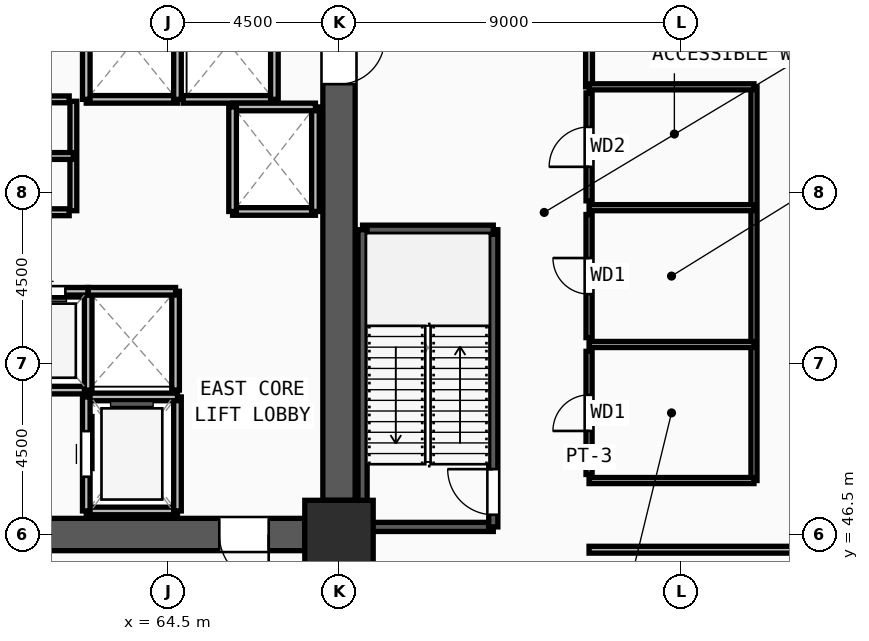
"""IFC4 building model, lengths in metres.
Left out: names, types, materials, properties, quantities, classifications, styles, units other than length and angle.
Written with IfcOpenShell. Run it as: python <this file> out.ifc"""

import sys

from ifc_helpers import new_model, si_unit, direction, frame, frame_2d, origin, origin_2d, place, context, subcontext, project, spatial, rectangle, extrude, source, transform, mapped, element, fill, save


model = new_model("IFC4")
c1 = context("Model", 3, precision=1e-05, world=origin(), true_north=direction((0.0, 1.0)))
c2 = subcontext(c1, "Body", "Model", "MODEL_VIEW")
j1 = project(units=[si_unit("LENGTHUNIT", "METRE"), si_unit("PLANEANGLEUNIT", "RADIAN")], contexts=[c1])
p1 = place(None, origin())
s1 = spatial("IfcSite", under=j1, at=p1, CompositionType="ELEMENT")
p2 = place(p1, origin())
s2 = spatial("IfcBuilding", under=s1, at=p2, CompositionType="ELEMENT")
p3 = place(p2, frame((0.0, 0.0, 14.4)))
s3 = spatial("IfcBuildingStorey", under=s2, at=p3, CompositionType="ELEMENT", Elevation=14.4)
m1 = source(origin(), c2, "Body", "SweptSolid", [
    extrude(rectangle(XDim=1.8, YDim=1.8, at=origin_2d()), origin(), (0.0, 0.0, 1.0), 4.5),
])
p4 = place(p3, frame((69.0, 46.5, 0.0), z_axis=(0.0, 0.0, 1.0), x_axis=(1.0, 0.0, 0.0)))
e1 = element("IfcColumn", 1, at=p4, inside=s3, PredefinedType="COLUMN", context=c2, shape_type="MappedRepresentation", body=[
    mapped(m1, transform((0.0, 0.0, 0.0), x_axis=(1.0, 0.0, 0.0), y_axis=(0.0, 1.0, 0.0), z_axis=(0.0, 0.0, 1.0), scale=1.0)),
])
p5 = place(p3, frame((69.0, 60.6, 0.0), z_axis=(0.0, 0.0, 1.0), x_axis=(0.0, -1.0, 0.0)))
e2 = element("IfcWall", 2, at=p5, inside=s3, PredefinedType="SHEAR", context=c2, shape_type="SweptSolid", body=[
    extrude(rectangle(XDim=13.2, YDim=0.85, at=frame_2d((6.6, 0.0))), origin(), (0.0, 0.0, 1.0), 4.25),
])
m2 = source(origin(), c2, "Body", "SweptSolid", [
    extrude(rectangle(XDim=1.2, YDim=2.2, at=frame_2d((0.6, 1.1))), frame((0.0, 0.435, 0.0), z_axis=(0.0, -1.0, 0.0), x_axis=(1.0, 0.0, 0.0)), (0.0, 0.0, 1.0), 0.87),
])
p6 = place(p5, frame((1.05, 0.0, 0.0)))
e3 = element("IfcOpeningElement", 3, at=p6, cuts=e2, PredefinedType="OPENING", context=c2, shape_type="MappedRepresentation", body=[
    mapped(m2, transform((0.0, 0.0, 0.0), x_axis=(1.0, 0.0, 0.0), y_axis=(0.0, 1.0, 0.0), z_axis=(0.0, 0.0, 1.0), scale=1.0)),
])
p7 = place(p3, frame((68.1, 46.5, 0.0), z_axis=(0.0, 0.0, 1.0), x_axis=(-1.0, 0.0, 0.0)))
e4 = element("IfcWall", 4, at=p7, inside=s3, PredefinedType="SHEAR", context=c2, shape_type="SweptSolid", body=[
    extrude(rectangle(XDim=7.2, YDim=0.85, at=frame_2d((3.6, 0.0))), origin(), (0.0, 0.0, 1.0), 4.25),
])
m3 = source(origin(), c2, "Body", "SweptSolid", [
    extrude(rectangle(XDim=1.3, YDim=2.2, at=frame_2d((0.65, 1.1))), frame((0.0, 0.435, 0.0), z_axis=(0.0, -1.0, 0.0), x_axis=(1.0, 0.0, 0.0)), (0.0, 0.0, 1.0), 0.87),
])
p8 = place(p7, frame((0.95, 0.0, 0.0)))
e5 = element("IfcOpeningElement", 5, at=p8, cuts=e4, PredefinedType="OPENING", context=c2, shape_type="MappedRepresentation", body=[
    mapped(m3, transform((0.0, 0.0, 0.0), x_axis=(1.0, 0.0, 0.0), y_axis=(0.0, 1.0, 0.0), z_axis=(0.0, 0.0, 1.0), scale=1.0)),
])
p9 = place(p3, frame((69.62, 46.7, 0.0), z_axis=(0.0, 0.0, 1.0), x_axis=(1.0, 0.0, 0.0)))
e6 = element("IfcWall", 6, at=p9, inside=s3, PredefinedType="SOLIDWALL", context=c2, shape_type="SweptSolid", body=[
    extrude(rectangle(XDim=3.44, YDim=0.24, at=frame_2d((1.72, 0.0))), origin(), (0.0, 0.0, 1.0), 4.25),
])
p10 = place(p3, frame((73.06, 46.7, 0.0), z_axis=(0.0, 0.0, 1.0), x_axis=(0.0, 1.0, 0.0)))
e7 = element("IfcWall", 7, at=p10, inside=s3, PredefinedType="SOLIDWALL", context=c2, shape_type="SweptSolid", body=[
    extrude(rectangle(XDim=7.82, YDim=0.24, at=frame_2d((3.91, 0.0))), origin(), (0.0, 0.0, 1.0), 4.25),
])
m4 = source(origin(), c2, "Body", "SweptSolid", [
    extrude(rectangle(XDim=1.2, YDim=2.2, at=frame_2d((0.6, 1.1))), frame((0.0, 0.13, 0.0), z_axis=(0.0, -1.0, 0.0), x_axis=(1.0, 0.0, 0.0)), (0.0, 0.0, 1.0), 0.26),
])
p11 = place(p10, frame((0.32, 0.0, 0.0)))
e8 = element("IfcOpeningElement", 8, at=p11, cuts=e7, PredefinedType="OPENING", context=c2, shape_type="MappedRepresentation", body=[
    mapped(m4, transform((0.0, 0.0, 0.0), x_axis=(1.0, 0.0, 0.0), y_axis=(0.0, 1.0, 0.0), z_axis=(0.0, 0.0, 1.0), scale=1.0)),
])
p12 = place(p3, frame((73.06, 54.52, 0.0), z_axis=(0.0, 0.0, 1.0), x_axis=(-1.0, 0.0, 0.0)))
e9 = element("IfcWall", 9, at=p12, inside=s3, PredefinedType="SOLIDWALL", context=c2, shape_type="SweptSolid", body=[
    extrude(rectangle(XDim=3.44, YDim=0.24, at=frame_2d((1.72, 0.0))), origin(), (0.0, 0.0, 1.0), 4.25),
])
p13 = place(p3, frame((69.62, 54.52, 0.0), z_axis=(0.0, 0.0, 1.0), x_axis=(0.0, -1.0, 0.0)))
e10 = element("IfcWall", 10, at=p13, inside=s3, PredefinedType="SOLIDWALL", context=c2, shape_type="SweptSolid", body=[
    extrude(rectangle(XDim=7.82, YDim=0.24, at=frame_2d((3.91, 0.0))), origin(), (0.0, 0.0, 1.0), 4.25),
])
p14 = place(p3, frame((62.35, 47.12, 0.0), z_axis=(0.0, 0.0, 1.0), x_axis=(1.0, 0.0, 0.0)))
e11 = element("IfcWall", 11, at=p14, inside=s3, PredefinedType="SOLIDWALL", context=c2, shape_type="SweptSolid", body=[
    extrude(rectangle(XDim=2.4, YDim=0.2, at=frame_2d((1.2, 0.0))), origin(), (0.0, 0.0, 1.0), 4.25),
])
p15 = place(p3, frame((64.75, 47.12, 0.0), z_axis=(0.0, 0.0, 1.0), x_axis=(0.0, 1.0, 0.0)))
e12 = element("IfcWall", 12, at=p15, inside=s3, PredefinedType="SOLIDWALL", context=c2, shape_type="SweptSolid", body=[
    extrude(rectangle(XDim=3.0, YDim=0.2, at=frame_2d((1.5, 0.0))), origin(), (0.0, 0.0, 1.0), 4.25),
])
p16 = place(p3, frame((64.75, 50.12, 0.0), z_axis=(0.0, 0.0, 1.0), x_axis=(-1.0, 0.0, 0.0)))
e13 = element("IfcWall", 13, at=p16, inside=s3, PredefinedType="SOLIDWALL", context=c2, shape_type="SweptSolid", body=[
    extrude(rectangle(XDim=2.4, YDim=0.2, at=frame_2d((1.2, 0.0))), origin(), (0.0, 0.0, 1.0), 4.25),
])
p17 = place(p3, frame((62.35, 50.12, 0.0), z_axis=(0.0, 0.0, 1.0), x_axis=(0.0, -1.0, 0.0)))
e14 = element("IfcWall", 14, at=p17, inside=s3, PredefinedType="SOLIDWALL", context=c2, shape_type="SweptSolid", body=[
    extrude(rectangle(XDim=3.0, YDim=0.2, at=frame_2d((1.5, 0.0))), origin(), (0.0, 0.0, 1.0), 4.25),
])
m5 = source(origin(), c2, "Body", "SweptSolid", [
    extrude(rectangle(XDim=1.2, YDim=2.3, at=frame_2d((0.6, 1.15))), frame((0.0, 0.11, 0.0), z_axis=(0.0, -1.0, 0.0), x_axis=(1.0, 0.0, 0.0)), (0.0, 0.0, 1.0), 0.22),
])
p18 = place(p17, frame((0.9, 0.0, 0.0)))
e15 = element("IfcOpeningElement", 15, at=p18, cuts=e14, PredefinedType="OPENING", context=c2, shape_type="MappedRepresentation", body=[
    mapped(m5, transform((0.0, 0.0, 0.0), x_axis=(1.0, 0.0, 0.0), y_axis=(0.0, 1.0, 0.0), z_axis=(0.0, 0.0, 1.0), scale=1.0)),
])
p19 = place(p3, frame((62.35, 57.95, 0.0), z_axis=(0.0, 0.0, 1.0), x_axis=(1.0, 0.0, 0.0)))
e16 = element("IfcWall", 16, at=p19, inside=s3, PredefinedType="SOLIDWALL", context=c2, shape_type="SweptSolid", body=[
    extrude(rectangle(XDim=2.4, YDim=0.2, at=frame_2d((1.2, 0.0))), origin(), (0.0, 0.0, 1.0), 4.25),
])
for number, where, z_axis, x_axis in (
    (17, (64.75, 57.95, 0.0), (0.0, 0.0, 1.0), (0.0, 1.0, 0.0)),
    (18, (62.35, 60.88, 0.0), (0.0, 0.0, 1.0), (0.0, -1.0, 0.0)),
):
    element("IfcWall", number, at=place(p3, frame(where, z_axis=z_axis, x_axis=x_axis)), inside=s3, PredefinedType="SOLIDWALL", context=c2, shape_type="SweptSolid", body=[
        extrude(rectangle(XDim=2.93, YDim=0.2, at=frame_2d((1.465, 0.0))), origin(), (0.0, 0.0, 1.0), 4.25),
    ])
p20 = place(p3, frame((64.9, 57.95, 0.0), z_axis=(0.0, 0.0, 1.0), x_axis=(1.0, 0.0, 0.0)))
e19 = element("IfcWall", 19, at=p20, inside=s3, PredefinedType="SOLIDWALL", context=c2, shape_type="SweptSolid", body=[
    extrude(rectangle(XDim=2.4, YDim=0.2, at=frame_2d((1.2, 0.0))), origin(), (0.0, 0.0, 1.0), 4.25),
])
p21 = place(p3, frame((67.3, 57.95, 0.0), z_axis=(0.0, 0.0, 1.0), x_axis=(0.0, 1.0, 0.0)))
e20 = element("IfcWall", 20, at=p21, inside=s3, PredefinedType="SOLIDWALL", context=c2, shape_type="SweptSolid", body=[
    extrude(rectangle(XDim=2.93, YDim=0.2, at=frame_2d((1.465, 0.0))), origin(), (0.0, 0.0, 1.0), 4.25),
])
p22 = place(p3, frame((66.2, 55.0, 0.0), z_axis=(0.0, 0.0, 1.0), x_axis=(1.0, 0.0, 0.0)))
e21 = element("IfcWall", 21, at=p22, inside=s3, PredefinedType="SOLIDWALL", context=c2, shape_type="SweptSolid", body=[
    extrude(rectangle(XDim=2.18, YDim=0.2, at=frame_2d((1.09, 0.0))), origin(), (0.0, 0.0, 1.0), 4.25),
])
p23 = place(p3, frame((68.38, 55.0, 0.0), z_axis=(0.0, 0.0, 1.0), x_axis=(0.0, 1.0, 0.0)))
e22 = element("IfcWall", 22, at=p23, inside=s3, PredefinedType="SOLIDWALL", context=c2, shape_type="SweptSolid", body=[
    extrude(rectangle(XDim=2.75, YDim=0.2, at=frame_2d((1.375, 0.0))), origin(), (0.0, 0.0, 1.0), 4.25),
])
p24 = place(p3, frame((68.38, 57.75, 0.0), z_axis=(0.0, 0.0, 1.0), x_axis=(-1.0, 0.0, 0.0)))
e23 = element("IfcWall", 23, at=p24, inside=s3, PredefinedType="SOLIDWALL", context=c2, shape_type="SweptSolid", body=[
    extrude(rectangle(XDim=2.18, YDim=0.2, at=frame_2d((1.09, 0.0))), origin(), (0.0, 0.0, 1.0), 4.25),
])
p25 = place(p3, frame((66.2, 57.75, 0.0), z_axis=(0.0, 0.0, 1.0), x_axis=(0.0, -1.0, 0.0)))
e24 = element("IfcWall", 24, at=p25, inside=s3, PredefinedType="SOLIDWALL", context=c2, shape_type="SweptSolid", body=[
    extrude(rectangle(XDim=2.75, YDim=0.2, at=frame_2d((1.375, 0.0))), origin(), (0.0, 0.0, 1.0), 4.25),
])
p26 = place(p3, frame((60.1, 50.3, 0.0), z_axis=(0.0, 0.0, 1.0), x_axis=(1.0, 0.0, 0.0)))
e25 = element("IfcWall", 25, at=p26, inside=s3, PredefinedType="SOLIDWALL", context=c2, shape_type="SweptSolid", body=[
    extrude(rectangle(XDim=2.3, YDim=0.2, at=frame_2d((1.15, 0.0))), origin(), (0.0, 0.0, 1.0), 4.25),
])
p27 = place(p3, frame((62.4, 50.3, 0.0), z_axis=(0.0, 0.0, 1.0), x_axis=(0.0, 1.0, 0.0)))
e26 = element("IfcWall", 26, at=p27, inside=s3, PredefinedType="SOLIDWALL", context=c2, shape_type="SweptSolid", body=[
    extrude(rectangle(XDim=2.6, YDim=0.2, at=frame_2d((1.3, 0.0))), origin(), (0.0, 0.0, 1.0), 4.25),
])
p28 = place(p3, frame((62.4, 52.9, 0.0), z_axis=(0.0, 0.0, 1.0), x_axis=(-1.0, 0.0, 0.0)))
e27 = element("IfcWall", 27, at=p28, inside=s3, PredefinedType="SOLIDWALL", context=c2, shape_type="SweptSolid", body=[
    extrude(rectangle(XDim=2.3, YDim=0.2, at=frame_2d((1.15, 0.0))), origin(), (0.0, 0.0, 1.0), 4.25),
])
m6 = source(origin(), c2, "Body", "SweptSolid", [
    extrude(rectangle(XDim=1.1, YDim=2.2, at=frame_2d((0.55, 1.1))), frame((0.0, 0.11, 0.0), z_axis=(0.0, -1.0, 0.0), x_axis=(1.0, 0.0, 0.0)), (0.0, 0.0, 1.0), 0.22),
])
p29 = place(p28, frame((0.6, 0.0, 0.0)))
e28 = element("IfcOpeningElement", 28, at=p29, cuts=e27, PredefinedType="OPENING", context=c2, shape_type="MappedRepresentation", body=[
    mapped(m6, transform((0.0, 0.0, 0.0), x_axis=(1.0, 0.0, 0.0), y_axis=(0.0, 1.0, 0.0), z_axis=(0.0, 0.0, 1.0), scale=1.0)),
])
p30 = place(p3, frame((64.7, 50.3, 0.0), z_axis=(0.0, 0.0, 1.0), x_axis=(0.0, 1.0, 0.0)))
e29 = element("IfcWall", 29, at=p30, inside=s3, PredefinedType="SOLIDWALL", context=c2, shape_type="SweptSolid", body=[
    extrude(rectangle(XDim=2.6, YDim=0.2, at=frame_2d((1.3, 0.0))), origin(), (0.0, 0.0, 1.0), 4.25),
])
p31 = place(p3, frame((64.7, 52.9, 0.0), z_axis=(0.0, 0.0, 1.0), x_axis=(-1.0, 0.0, 0.0)))
e30 = element("IfcWall", 30, at=p31, inside=s3, PredefinedType="SOLIDWALL", context=c2, shape_type="SweptSolid", body=[
    extrude(rectangle(XDim=2.3, YDim=0.2, at=frame_2d((1.15, 0.0))), origin(), (0.0, 0.0, 1.0), 4.25),
])
p32 = place(p3, frame((59.84, 54.98, 0.0), z_axis=(0.0, 0.0, 1.0), x_axis=(1.0, 0.0, 0.0)))
e31 = element("IfcWall", 31, at=p32, inside=s3, PredefinedType="PARTITIONING", context=c2, shape_type="SweptSolid", body=[
    extrude(rectangle(XDim=2.06, YDim=0.18, at=frame_2d((1.03, 0.0))), origin(), (0.0, 0.0, 1.0), 4.25),
])
m7 = source(origin(), c2, "Body", "SweptSolid", [
    extrude(rectangle(XDim=0.85, YDim=2.1, at=frame_2d((0.425, 1.05))), frame((0.0, 0.1, 0.0), z_axis=(0.0, -1.0, 0.0), x_axis=(1.0, 0.0, 0.0)), (0.0, 0.0, 1.0), 0.2),
])
p33 = place(p32, frame((0.605, 0.0, 0.0)))
e32 = element("IfcOpeningElement", 32, at=p33, cuts=e31, PredefinedType="OPENING", context=c2, shape_type="MappedRepresentation", body=[
    mapped(m7, transform((0.0, 0.0, 0.0), x_axis=(1.0, 0.0, 0.0), y_axis=(0.0, 1.0, 0.0), z_axis=(0.0, 0.0, 1.0), scale=1.0)),
])
p34 = place(p3, frame((59.84, 57.95, 0.0), z_axis=(0.0, 0.0, 1.0), x_axis=(1.0, 0.0, 0.0)))
e33 = element("IfcWall", 33, at=p34, inside=s3, PredefinedType="PARTITIONING", context=c2, shape_type="SweptSolid", body=[
    extrude(rectangle(XDim=2.06, YDim=0.18, at=frame_2d((1.03, 0.0))), origin(), (0.0, 0.0, 1.0), 4.25),
])
p35 = place(p34, frame((0.605, 0.0, 0.0)))
e34 = element("IfcOpeningElement", 34, at=p35, cuts=e33, PredefinedType="OPENING", context=c2, shape_type="MappedRepresentation", body=[
    mapped(m7, transform((0.0, 0.0, 0.0), x_axis=(1.0, 0.0, 0.0), y_axis=(0.0, 1.0, 0.0), z_axis=(0.0, 0.0, 1.0), scale=1.0)),
])
p36 = place(p3, frame((75.58, 48.08, 0.0), z_axis=(0.0, 0.0, 1.0), x_axis=(0.0, 1.0, 0.0)))
e35 = element("IfcWall", 35, at=p36, inside=s3, PredefinedType="PARTITIONING", context=c2, shape_type="SweptSolid", body=[
    extrude(rectangle(XDim=3.24, YDim=0.16, at=frame_2d((1.62, 0.0))), origin(), (0.0, 0.0, 1.0), 4.25),
])
m8 = source(origin(), c2, "Body", "SweptSolid", [
    extrude(rectangle(XDim=0.95, YDim=2.15, at=frame_2d((0.475, 1.075))), frame((0.0, 0.09, 0.0), z_axis=(0.0, -1.0, 0.0), x_axis=(1.0, 0.0, 0.0)), (0.0, 0.0, 1.0), 0.18),
])
p37 = place(p36, frame((1.145, 0.0, 0.0)))
e36 = element("IfcOpeningElement", 36, at=p37, cuts=e35, PredefinedType="OPENING", context=c2, shape_type="MappedRepresentation", body=[
    mapped(m8, transform((0.0, 0.0, 0.0), x_axis=(1.0, 0.0, 0.0), y_axis=(0.0, 1.0, 0.0), z_axis=(0.0, 0.0, 1.0), scale=1.0)),
])
p38 = place(p3, frame((75.58, 51.68, 0.0), z_axis=(0.0, 0.0, 1.0), x_axis=(0.0, 1.0, 0.0)))
e37 = element("IfcWall", 37, at=p38, inside=s3, PredefinedType="PARTITIONING", context=c2, shape_type="SweptSolid", body=[
    extrude(rectangle(XDim=3.24, YDim=0.16, at=frame_2d((1.62, 0.0))), origin(), (0.0, 0.0, 1.0), 4.25),
])
p39 = place(p38, frame((1.145, 0.0, 0.0)))
e38 = element("IfcOpeningElement", 38, at=p39, cuts=e37, PredefinedType="OPENING", context=c2, shape_type="MappedRepresentation", body=[
    mapped(m8, transform((0.0, 0.0, 0.0), x_axis=(1.0, 0.0, 0.0), y_axis=(0.0, 1.0, 0.0), z_axis=(0.0, 0.0, 1.0), scale=1.0)),
])
p40 = place(p3, frame((75.58, 55.28, 0.0), z_axis=(0.0, 0.0, 1.0), x_axis=(0.0, 1.0, 0.0)))
e39 = element("IfcWall", 39, at=p40, inside=s3, PredefinedType="PARTITIONING", context=c2, shape_type="SweptSolid", body=[
    extrude(rectangle(XDim=2.84, YDim=0.16, at=frame_2d((1.42, 0.0))), origin(), (0.0, 0.0, 1.0), 4.25),
])
m9 = source(origin(), c2, "Body", "SweptSolid", [
    extrude(rectangle(XDim=1.05, YDim=2.15, at=frame_2d((0.525, 1.075))), frame((0.0, 0.09, 0.0), z_axis=(0.0, -1.0, 0.0), x_axis=(1.0, 0.0, 0.0)), (0.0, 0.0, 1.0), 0.18),
])
p41 = place(p40, frame((0.895, 0.0, 0.0)))
e40 = element("IfcOpeningElement", 40, at=p41, cuts=e39, PredefinedType="OPENING", context=c2, shape_type="MappedRepresentation", body=[
    mapped(m9, transform((0.0, 0.0, 0.0), x_axis=(1.0, 0.0, 0.0), y_axis=(0.0, 1.0, 0.0), z_axis=(0.0, 0.0, 1.0), scale=1.0)),
])
p42 = place(p3, frame((75.58, 58.28, 0.0), z_axis=(0.0, 0.0, 1.0), x_axis=(0.0, 1.0, 0.0)))
e41 = element("IfcWall", 41, at=p42, inside=s3, PredefinedType="PARTITIONING", context=c2, shape_type="SweptSolid", body=[
    extrude(rectangle(XDim=9.82, YDim=0.18, at=frame_2d((4.91, 0.0))), origin(), (0.0, 0.0, 1.0), 4.25),
])
m10 = source(origin(), c2, "Body", "SweptSolid", [
    extrude(rectangle(XDim=1.5, YDim=2.2, at=frame_2d((0.75, 1.1))), frame((0.0, 0.1, 0.0), z_axis=(0.0, -1.0, 0.0), x_axis=(1.0, 0.0, 0.0)), (0.0, 0.0, 1.0), 0.2),
])
p43 = place(p42, frame((4.16, 0.0, 0.0)))
e42 = element("IfcOpeningElement", 42, at=p43, cuts=e41, PredefinedType="OPENING", context=c2, shape_type="MappedRepresentation", body=[
    mapped(m10, transform((0.0, 0.0, 0.0), x_axis=(1.0, 0.0, 0.0), y_axis=(0.0, 1.0, 0.0), z_axis=(0.0, 0.0, 1.0), scale=1.0)),
])
p44 = place(p3, frame((62.01, 55.02, 0.0), z_axis=(0.0, 0.0, 1.0), x_axis=(0.0, 1.0, 0.0)))
e43 = element("IfcWall", 43, at=p44, inside=s3, PredefinedType="PARTITIONING", context=c2, shape_type="SweptSolid", body=[
    extrude(rectangle(XDim=2.88, YDim=0.18, at=frame_2d((1.44, 0.0))), origin(), (0.0, 0.0, 1.0), 4.25),
])
p45 = place(p3, frame((59.72, 56.46, 0.0), z_axis=(0.0, 0.0, 1.0), x_axis=(1.0, 0.0, 0.0)))
e44 = element("IfcWall", 44, at=p45, inside=s3, PredefinedType="PARTITIONING", context=c2, shape_type="SweptSolid", body=[
    extrude(rectangle(XDim=2.29, YDim=0.18, at=frame_2d((1.145, 0.0))), origin(), (0.0, 0.0, 1.0), 4.25),
])
p46 = place(p3, frame((79.92, 47.92, 0.0), z_axis=(0.0, 0.0, 1.0), x_axis=(0.0, 1.0, 0.0)))
e45 = element("IfcWall", 45, at=p46, inside=s3, PredefinedType="PARTITIONING", context=c2, shape_type="SweptSolid", body=[
    extrude(rectangle(XDim=10.36, YDim=0.16, at=frame_2d((5.18, 0.0))), origin(), (0.0, 0.0, 1.0), 4.25),
])
for number, where, z_axis, x_axis in (
    (46, (75.58, 47.92, 0.0), (0.0, 0.0, 1.0), (1.0, 0.0, 0.0)),
    (47, (75.58, 51.5, 0.0), (0.0, 0.0, 1.0), (1.0, 0.0, 0.0)),
    (48, (75.58, 55.1, 0.0), (0.0, 0.0, 1.0), (1.0, 0.0, 0.0)),
    (49, (75.58, 58.28, 0.0), (0.0, 0.0, 1.0), (1.0, 0.0, 0.0)),
):
    element("IfcWall", number, at=place(p3, frame(where, z_axis=z_axis, x_axis=x_axis)), inside=s3, PredefinedType="PARTITIONING", context=c2, shape_type="SweptSolid", body=[
        extrude(rectangle(XDim=4.34, YDim=0.16, at=frame_2d((2.17, 0.0))), origin(), (0.0, 0.0, 1.0), 4.25),
    ])
p47 = place(p3, frame((75.58, 46.1, 0.0), z_axis=(0.0, 0.0, 1.0), x_axis=(1.0, 0.0, 0.0)))
e50 = element("IfcWall", 50, at=p47, inside=s3, PredefinedType="PARTITIONING", context=c2, shape_type="SweptSolid", body=[
    extrude(rectangle(XDim=24.995, YDim=0.18, at=frame_2d((12.498, 0.0))), origin(), (0.0, 0.0, 1.0), 4.25),
])
m11 = source(origin(), c2, "Body", "SweptSolid", [
    extrude(rectangle(XDim=1.3, YDim=2.2, at=frame_2d((0.65, 1.1))), frame((0.0, 0.025, 0.0), z_axis=(0.0, -1.0, 0.0), x_axis=(1.0, 0.0, 0.0)), (0.0, 0.0, 1.0), 0.05),
])
p48 = place(p8, origin())
e51 = element("IfcDoor", 51, at=p48, inside=s3, OperationType="SINGLE_SWING_LEFT", PredefinedType="DOOR", context=c2, shape_type="MappedRepresentation", body=[
    mapped(m11, transform((0.0, 0.0, 0.0), x_axis=(1.0, 0.0, 0.0), y_axis=(0.0, 1.0, 0.0), z_axis=(0.0, 0.0, 1.0), scale=1.0)),
])
fill(e5, e51)
m12 = source(origin(), c2, "Body", "SweptSolid", [
    extrude(rectangle(XDim=1.2, YDim=2.2, at=frame_2d((0.6, 1.1))), frame((0.0, 0.025, 0.0), z_axis=(0.0, -1.0, 0.0), x_axis=(1.0, 0.0, 0.0)), (0.0, 0.0, 1.0), 0.05),
])
p49 = place(p6, origin())
e52 = element("IfcDoor", 52, at=p49, inside=s3, OperationType="SINGLE_SWING_LEFT", PredefinedType="DOOR", context=c2, shape_type="MappedRepresentation", body=[
    mapped(m12, transform((0.0, 0.0, 0.0), x_axis=(1.0, 0.0, 0.0), y_axis=(0.0, 1.0, 0.0), z_axis=(0.0, 0.0, 1.0), scale=1.0)),
])
fill(e3, e52)
p50 = place(p11, origin())
e53 = element("IfcDoor", 53, at=p50, inside=s3, OperationType="SINGLE_SWING_RIGHT", PredefinedType="DOOR", context=c2, shape_type="MappedRepresentation", body=[
    mapped(m12, transform((0.0, 0.0, 0.0), x_axis=(1.0, 0.0, 0.0), y_axis=(0.0, 1.0, 0.0), z_axis=(0.0, 0.0, 1.0), scale=1.0)),
])
fill(e8, e53)
m13 = source(origin(), c2, "Body", "SweptSolid", [
    extrude(rectangle(XDim=1.2, YDim=2.3, at=frame_2d((0.6, 1.15))), frame((0.0, 0.025, 0.0), z_axis=(0.0, -1.0, 0.0), x_axis=(1.0, 0.0, 0.0)), (0.0, 0.0, 1.0), 0.05),
])
p51 = place(p18, origin())
e54 = element("IfcDoor", 54, at=p51, inside=s3, OperationType="SLIDING_TO_LEFT", PredefinedType="DOOR", context=c2, shape_type="MappedRepresentation", body=[
    mapped(m13, transform((0.0, 0.0, 0.0), x_axis=(1.0, 0.0, 0.0), y_axis=(0.0, 1.0, 0.0), z_axis=(0.0, 0.0, 1.0), scale=1.0)),
])
fill(e15, e54)
m14 = source(origin(), c2, "Body", "SweptSolid", [
    extrude(rectangle(XDim=1.1, YDim=2.2, at=frame_2d((0.55, 1.1))), frame((0.0, 0.025, 0.0), z_axis=(0.0, -1.0, 0.0), x_axis=(1.0, 0.0, 0.0)), (0.0, 0.0, 1.0), 0.05),
])
p52 = place(p29, origin())
e55 = element("IfcDoor", 55, at=p52, inside=s3, OperationType="SLIDING_TO_LEFT", PredefinedType="DOOR", context=c2, shape_type="MappedRepresentation", body=[
    mapped(m14, transform((0.0, 0.0, 0.0), x_axis=(1.0, 0.0, 0.0), y_axis=(0.0, 1.0, 0.0), z_axis=(0.0, 0.0, 1.0), scale=1.0)),
])
fill(e28, e55)
m15 = source(origin(), c2, "Body", "SweptSolid", [
    extrude(rectangle(XDim=0.95, YDim=2.15, at=frame_2d((0.475, 1.075))), frame((0.0, 0.025, 0.0), z_axis=(0.0, -1.0, 0.0), x_axis=(1.0, 0.0, 0.0)), (0.0, 0.0, 1.0), 0.05),
])
p53 = place(p37, origin())
e56 = element("IfcDoor", 56, at=p53, inside=s3, OperationType="SINGLE_SWING_LEFT", PredefinedType="DOOR", context=c2, shape_type="MappedRepresentation", body=[
    mapped(m15, transform((0.0, 0.0, 0.0), x_axis=(1.0, 0.0, 0.0), y_axis=(0.0, 1.0, 0.0), z_axis=(0.0, 0.0, 1.0), scale=1.0)),
])
fill(e36, e56)
p54 = place(p39, origin())
e57 = element("IfcDoor", 57, at=p54, inside=s3, OperationType="SINGLE_SWING_RIGHT", PredefinedType="DOOR", context=c2, shape_type="MappedRepresentation", body=[
    mapped(m15, transform((0.0, 0.0, 0.0), x_axis=(1.0, 0.0, 0.0), y_axis=(0.0, 1.0, 0.0), z_axis=(0.0, 0.0, 1.0), scale=1.0)),
])
fill(e38, e57)
m16 = source(origin(), c2, "Body", "SweptSolid", [
    extrude(rectangle(XDim=1.05, YDim=2.15, at=frame_2d((0.525, 1.075))), frame((0.0, 0.025, 0.0), z_axis=(0.0, -1.0, 0.0), x_axis=(1.0, 0.0, 0.0)), (0.0, 0.0, 1.0), 0.05),
])
p55 = place(p41, origin())
e58 = element("IfcDoor", 58, at=p55, inside=s3, OperationType="SINGLE_SWING_LEFT", PredefinedType="DOOR", context=c2, shape_type="MappedRepresentation", body=[
    mapped(m16, transform((0.0, 0.0, 0.0), x_axis=(1.0, 0.0, 0.0), y_axis=(0.0, 1.0, 0.0), z_axis=(0.0, 0.0, 1.0), scale=1.0)),
])
fill(e40, e58)
save(model, sys.argv[1])
